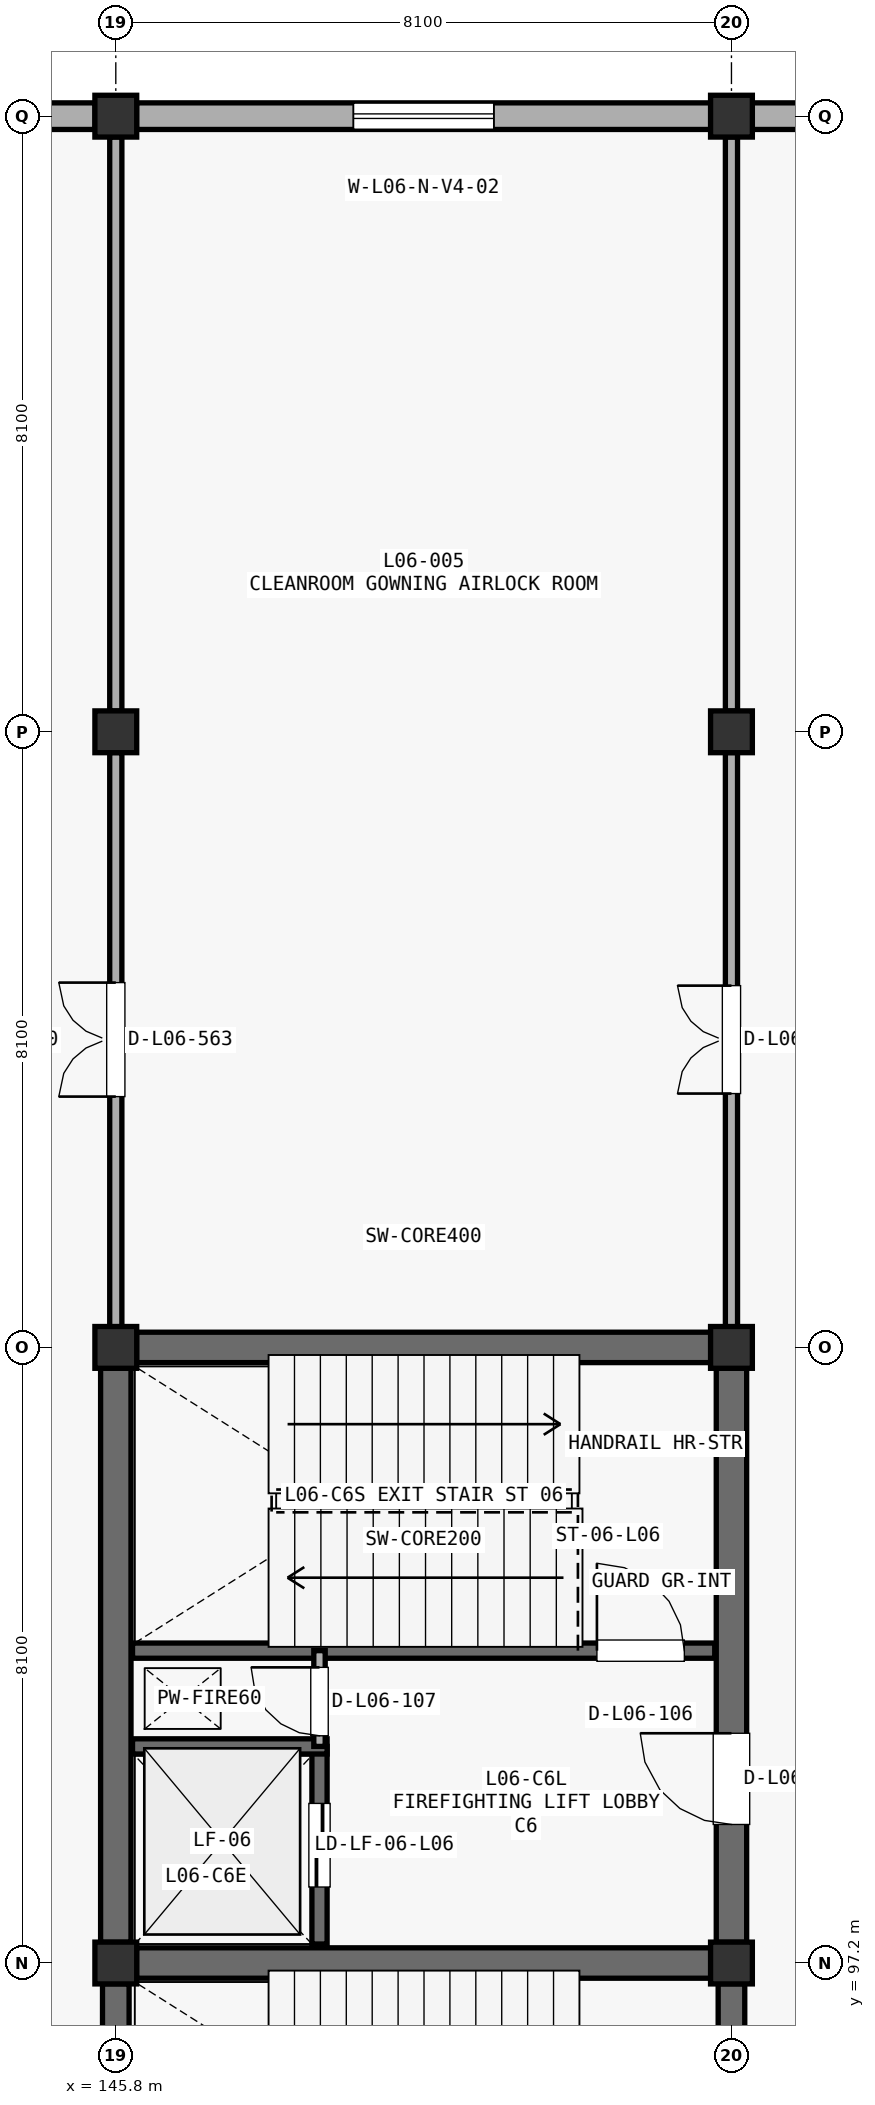
"""IFC4 building model, lengths in metres.
Left out: names, types, materials, properties, quantities, classifications, styles, units other than length and angle.
Written with IfcOpenShell. Run it as: python <this file> out.ifc"""

import sys

from ifc_helpers import new_model, si_unit, direction, frame, frame_2d, origin, origin_2d, place, context, subcontext, project, spatial, rectangle, extrude, element, fill, save


model = new_model("IFC4")
c1 = context("Model", 3, precision=1e-05, world=origin(), true_north=direction((0.0, 1.0)))
c2 = subcontext(c1, "Body", "Model", "MODEL_VIEW")
j1 = project(units=[si_unit("LENGTHUNIT", "METRE"), si_unit("PLANEANGLEUNIT", "RADIAN")], contexts=[c1])
p1 = place(None, origin())
s1 = spatial("IfcSite", under=j1, at=p1, CompositionType="ELEMENT")
p2 = place(p1, origin())
s2 = spatial("IfcBuilding", under=s1, at=p2, CompositionType="ELEMENT")
p3 = place(p2, frame((0.0, 0.0, 27.37)))
s3 = spatial("IfcBuildingStorey", under=s2, at=p3, CompositionType="ELEMENT", Elevation=27.37)
for number, where, z_axis, x_axis in (
    (1, (145.8, 97.2, 0.0), (0.0, 0.0, 1.0), (1.0, 0.0, 0.0)),
    (2, (145.8, 105.3, 0.0), (0.0, 0.0, 1.0), (1.0, 0.0, 0.0)),
    (3, (145.8, 113.4, 0.0), (0.0, 0.0, 1.0), (1.0, 0.0, 0.0)),
    (4, (145.8, 121.5, 0.0), (0.0, 0.0, 1.0), (1.0, 0.0, 0.0)),
    (5, (153.9, 97.2, 0.0), (0.0, 0.0, 1.0), (1.0, 0.0, 0.0)),
    (6, (153.9, 105.3, 0.0), (0.0, 0.0, 1.0), (1.0, 0.0, 0.0)),
    (7, (153.9, 113.4, 0.0), (0.0, 0.0, 1.0), (1.0, 0.0, 0.0)),
    (8, (153.9, 121.5, 0.0), (0.0, 0.0, 1.0), (1.0, 0.0, 0.0)),
):
    element("IfcColumn", number, at=place(p3, frame(where, z_axis=z_axis, x_axis=x_axis)), inside=s3, PredefinedType="COLUMN", context=c2, shape_type="SweptSolid", body=[
        extrude(rectangle(XDim=0.55, YDim=0.55, at=origin_2d()), origin(), (0.0, 0.0, 1.0), 4.42),
    ])
p4 = place(p3, frame((137.973, 121.5, 0.0), z_axis=(0.0, 0.0, 1.0), x_axis=(1.0, 0.0, 0.0)))
e9 = element("IfcWall", 9, at=p4, inside=s3, PredefinedType="STANDARD", context=c2, shape_type="SweptSolid", body=[
    extrude(rectangle(XDim=7.554, YDim=0.35, at=frame_2d((3.777, 0.0))), origin(), (0.0, 0.0, 1.0), 3.212),
])
p5 = place(p4, frame((2.452, 0.0, 0.85)))
e10 = element("IfcOpeningElement", 10, at=p5, cuts=e9, PredefinedType="OPENING", context=c2, shape_type="SweptSolid", body=[
    extrude(rectangle(XDim=2.65, YDim=1.8, at=frame_2d((1.325, 0.9))), frame((0.0, 0.185, 0.0), z_axis=(0.0, -1.0, 0.0), x_axis=(1.0, 0.0, 0.0)), (0.0, 0.0, 1.0), 0.37),
])
p6 = place(p3, frame((146.073, 121.5, 0.0), z_axis=(0.0, 0.0, 1.0), x_axis=(1.0, 0.0, 0.0)))
e11 = element("IfcWall", 11, at=p6, inside=s3, PredefinedType="STANDARD", context=c2, shape_type="SweptSolid", body=[
    extrude(rectangle(XDim=7.554, YDim=0.35, at=frame_2d((3.777, 0.0))), origin(), (0.0, 0.0, 1.0), 3.512),
])
p7 = place(p6, frame((2.852, 0.0, 0.85)))
e12 = element("IfcOpeningElement", 12, at=p7, cuts=e11, PredefinedType="OPENING", context=c2, shape_type="SweptSolid", body=[
    extrude(rectangle(XDim=1.85, YDim=1.8, at=frame_2d((0.925, 0.9))), frame((0.0, 0.185, 0.0), z_axis=(0.0, -1.0, 0.0), x_axis=(1.0, 0.0, 0.0)), (0.0, 0.0, 1.0), 0.37),
])
p8 = place(p3, frame((154.173, 121.5, 0.0), z_axis=(0.0, 0.0, 1.0), x_axis=(1.0, 0.0, 0.0)))
e13 = element("IfcWall", 13, at=p8, inside=s3, PredefinedType="STANDARD", context=c2, shape_type="SweptSolid", body=[
    extrude(rectangle(XDim=7.554, YDim=0.35, at=frame_2d((3.777, 0.0))), origin(), (0.0, 0.0, 1.0), 3.512),
])
p9 = place(p8, frame((3.002, 0.0, 0.85)))
e14 = element("IfcOpeningElement", 14, at=p9, cuts=e13, PredefinedType="OPENING", context=c2, shape_type="SweptSolid", body=[
    extrude(rectangle(XDim=1.55, YDim=1.8, at=frame_2d((0.775, 0.9))), frame((0.0, 0.185, 0.0), z_axis=(0.0, -1.0, 0.0), x_axis=(1.0, 0.0, 0.0)), (0.0, 0.0, 1.0), 0.37),
])
p10 = place(p3, frame((146.073, 105.3, 0.0), z_axis=(0.0, 0.0, 1.0), x_axis=(1.0, 0.0, 0.0)))
e15 = element("IfcWall", 15, at=p10, inside=s3, PredefinedType="SHEAR", context=c2, shape_type="SweptSolid", body=[
    extrude(rectangle(XDim=7.554, YDim=0.4, at=frame_2d((3.777, 0.0))), origin(), (0.0, 0.0, 1.0), 4.162),
])
p11 = place(p3, frame((145.8, 97.473, 0.0), z_axis=(0.0, 0.0, 1.0), x_axis=(0.0, 1.0, 0.0)))
e16 = element("IfcWall", 16, at=p11, inside=s3, PredefinedType="SHEAR", context=c2, shape_type="SweptSolid", body=[
    extrude(rectangle(XDim=7.554, YDim=0.4, at=frame_2d((3.777, 0.0))), origin(), (0.0, 0.0, 1.0), 4.162),
])
p12 = place(p3, frame((153.9, 97.473, 0.0), z_axis=(0.0, 0.0, 1.0), x_axis=(0.0, 1.0, 0.0)))
e17 = element("IfcWall", 17, at=p12, inside=s3, PredefinedType="SHEAR", context=c2, shape_type="SweptSolid", body=[
    extrude(rectangle(XDim=7.554, YDim=0.4, at=frame_2d((3.777, 0.0))), origin(), (0.0, 0.0, 1.0), 4.162),
])
p13 = place(p12, frame((1.55, 0.0, 0.0)))
e18 = element("IfcOpeningElement", 18, at=p13, cuts=e17, PredefinedType="OPENING", context=c2, shape_type="SweptSolid", body=[
    extrude(rectangle(XDim=1.2, YDim=2.2, at=frame_2d((0.6, 1.1))), frame((0.0, 0.21, 0.0), z_axis=(0.0, -1.0, 0.0), x_axis=(1.0, 0.0, 0.0)), (0.0, 0.0, 1.0), 0.42),
])
p14 = place(p3, frame((146.073, 97.2, 0.0), z_axis=(0.0, 0.0, 1.0), x_axis=(1.0, 0.0, 0.0)))
e19 = element("IfcWall", 19, at=p14, inside=s3, PredefinedType="SHEAR", context=c2, shape_type="SweptSolid", body=[
    extrude(rectangle(XDim=7.554, YDim=0.4, at=frame_2d((3.777, 0.0))), origin(), (0.0, 0.0, 1.0), 4.162),
])
p15 = place(p3, frame((146.02, 101.31, 0.0), z_axis=(0.0, 0.0, 1.0), x_axis=(1.0, 0.0, 0.0)))
e20 = element("IfcWall", 20, at=p15, inside=s3, PredefinedType="SHEAR", context=c2, shape_type="SweptSolid", body=[
    extrude(rectangle(XDim=7.66, YDim=0.2, at=frame_2d((3.83, 0.0))), origin(), (0.0, 0.0, 1.0), 4.162),
])
p16 = place(p15, frame((6.11, 0.0, 0.0)))
e21 = element("IfcOpeningElement", 21, at=p16, cuts=e20, PredefinedType="OPENING", context=c2, shape_type="SweptSolid", body=[
    extrude(rectangle(XDim=1.15, YDim=2.2, at=frame_2d((0.575, 1.1))), frame((0.0, 0.11, 0.0), z_axis=(0.0, -1.0, 0.0), x_axis=(1.0, 0.0, 0.0)), (0.0, 0.0, 1.0), 0.22),
])
p17 = place(p3, frame((148.48, 97.45, 0.0), z_axis=(0.0, 0.0, 1.0), x_axis=(0.0, 1.0, 0.0)))
e22 = element("IfcWall", 22, at=p17, inside=s3, PredefinedType="SHEAR", context=c2, shape_type="SweptSolid", body=[
    extrude(rectangle(XDim=2.6, YDim=0.2, at=frame_2d((1.3, 0.0))), origin(), (0.0, 0.0, 1.0), 4.162),
])
p18 = place(p17, frame((0.75, 0.0, 0.0)))
e23 = element("IfcOpeningElement", 23, at=p18, cuts=e22, PredefinedType="OPENING", context=c2, shape_type="SweptSolid", body=[
    extrude(rectangle(XDim=1.1, YDim=2.2, at=frame_2d((0.55, 1.1))), frame((0.0, 0.11, 0.0), z_axis=(0.0, -1.0, 0.0), x_axis=(1.0, 0.0, 0.0)), (0.0, 0.0, 1.0), 0.22),
])
p19 = place(p3, frame((146.02, 100.05, 0.0), z_axis=(0.0, 0.0, 1.0), x_axis=(1.0, 0.0, 0.0)))
e24 = element("IfcWall", 24, at=p19, inside=s3, PredefinedType="SHEAR", context=c2, shape_type="SweptSolid", body=[
    extrude(rectangle(XDim=2.56, YDim=0.2, at=frame_2d((1.28, 0.0))), origin(), (0.0, 0.0, 1.0), 4.162),
])
p20 = place(p3, frame((148.48, 100.05, 0.0), z_axis=(0.0, 0.0, 1.0), x_axis=(0.0, 1.0, 0.0)))
e25 = element("IfcWall", 25, at=p20, inside=s3, PredefinedType="PARTITIONING", context=c2, shape_type="SweptSolid", body=[
    extrude(rectangle(XDim=1.26, YDim=0.15, at=frame_2d((0.63, 0.0))), origin(), (0.0, 0.0, 1.0), 4.162),
])
p21 = place(p20, frame((0.14, 0.0, 0.0)))
e26 = element("IfcOpeningElement", 26, at=p21, cuts=e25, PredefinedType="OPENING", context=c2, shape_type="SweptSolid", body=[
    extrude(rectangle(XDim=0.9, YDim=2.15, at=frame_2d((0.45, 1.075))), frame((0.0, 0.085, 0.0), z_axis=(0.0, -1.0, 0.0), x_axis=(1.0, 0.0, 0.0)), (0.0, 0.0, 1.0), 0.17),
])
p22 = place(p3, frame((145.8, 89.373, 0.0), z_axis=(0.0, 0.0, 1.0), x_axis=(0.0, 1.0, 0.0)))
e27 = element("IfcWall", 27, at=p22, inside=s3, PredefinedType="SHEAR", context=c2, shape_type="SweptSolid", body=[
    extrude(rectangle(XDim=7.554, YDim=0.35, at=frame_2d((3.777, 0.0))), origin(), (0.0, 0.0, 1.0), 4.162),
])
p23 = place(p3, frame((153.9, 89.373, 0.0), z_axis=(0.0, 0.0, 1.0), x_axis=(0.0, 1.0, 0.0)))
e28 = element("IfcWall", 28, at=p23, inside=s3, PredefinedType="SHEAR", context=c2, shape_type="SweptSolid", body=[
    extrude(rectangle(XDim=7.554, YDim=0.35, at=frame_2d((3.777, 0.0))), origin(), (0.0, 0.0, 1.0), 4.162),
])
p24 = place(p23, frame((1.55, 0.0, 0.0)))
e29 = element("IfcOpeningElement", 29, at=p24, cuts=e28, PredefinedType="OPENING", context=c2, shape_type="SweptSolid", body=[
    extrude(rectangle(XDim=1.2, YDim=2.2, at=frame_2d((0.6, 1.1))), frame((0.0, 0.185, 0.0), z_axis=(0.0, -1.0, 0.0), x_axis=(1.0, 0.0, 0.0)), (0.0, 0.0, 1.0), 0.37),
])
p25 = place(p3, frame((145.8, 105.573, 0.0), z_axis=(0.0, 0.0, 1.0), x_axis=(0.0, 1.0, 0.0)))
e30 = element("IfcWall", 30, at=p25, inside=s3, PredefinedType="PARTITIONING", context=c2, shape_type="SweptSolid", body=[
    extrude(rectangle(XDim=7.554, YDim=0.16, at=frame_2d((3.777, 0.0))), origin(), (0.0, 0.0, 1.0), 3.512),
])
p26 = place(p25, frame((3.027, 0.0, 0.0)))
e31 = element("IfcOpeningElement", 31, at=p26, cuts=e30, PredefinedType="OPENING", context=c2, shape_type="SweptSolid", body=[
    extrude(rectangle(XDim=1.5, YDim=2.2, at=frame_2d((0.75, 1.1))), frame((0.0, 0.09, 0.0), z_axis=(0.0, -1.0, 0.0), x_axis=(1.0, 0.0, 0.0)), (0.0, 0.0, 1.0), 0.18),
])
p27 = place(p3, frame((145.8, 113.673, 0.0), z_axis=(0.0, 0.0, 1.0), x_axis=(0.0, 1.0, 0.0)))
e32 = element("IfcWall", 32, at=p27, inside=s3, PredefinedType="PARTITIONING", context=c2, shape_type="SweptSolid", body=[
    extrude(rectangle(XDim=7.554, YDim=0.16, at=frame_2d((3.777, 0.0))), origin(), (0.0, 0.0, 1.0), 3.562),
])
p28 = place(p3, frame((153.9, 105.573, 0.0), z_axis=(0.0, 0.0, 1.0), x_axis=(0.0, 1.0, 0.0)))
e33 = element("IfcWall", 33, at=p28, inside=s3, PredefinedType="PARTITIONING", context=c2, shape_type="SweptSolid", body=[
    extrude(rectangle(XDim=7.554, YDim=0.16, at=frame_2d((3.777, 0.0))), origin(), (0.0, 0.0, 1.0), 3.312),
])
p29 = place(p28, frame((3.067, 0.0, 0.0)))
e34 = element("IfcOpeningElement", 34, at=p29, cuts=e33, PredefinedType="OPENING", context=c2, shape_type="SweptSolid", body=[
    extrude(rectangle(XDim=1.42, YDim=2.25, at=frame_2d((0.71, 1.125))), frame((0.0, 0.09, 0.0), z_axis=(0.0, -1.0, 0.0), x_axis=(1.0, 0.0, 0.0)), (0.0, 0.0, 1.0), 0.18),
])
p30 = place(p3, frame((153.9, 113.673, 0.0), z_axis=(0.0, 0.0, 1.0), x_axis=(0.0, 1.0, 0.0)))
e35 = element("IfcWall", 35, at=p30, inside=s3, PredefinedType="PARTITIONING", context=c2, shape_type="SweptSolid", body=[
    extrude(rectangle(XDim=7.554, YDim=0.16, at=frame_2d((3.777, 0.0))), origin(), (0.0, 0.0, 1.0), 3.212),
])
p31 = place(p7, origin())
e36 = element("IfcWindow", 36, at=p31, inside=s3, PartitioningType="SINGLE_PANEL", PredefinedType="WINDOW", context=c2, shape_type="SweptSolid", body=[
    extrude(rectangle(XDim=1.85, YDim=1.8, at=frame_2d((0.925, 0.9))), frame((0.0, 0.03, 0.0), z_axis=(0.0, -1.0, 0.0), x_axis=(1.0, 0.0, 0.0)), (0.0, 0.0, 1.0), 0.06),
])
fill(e12, e36)
p32 = place(p13, origin())
e37 = element("IfcDoor", 37, at=p32, inside=s3, OperationType="SINGLE_SWING_RIGHT", PredefinedType="DOOR", context=c2, shape_type="SweptSolid", body=[
    extrude(rectangle(XDim=1.2, YDim=2.2, at=frame_2d((0.6, 1.1))), frame((0.0, 0.025, 0.0), z_axis=(0.0, -1.0, 0.0), x_axis=(1.0, 0.0, 0.0)), (0.0, 0.0, 1.0), 0.05),
])
fill(e18, e37)
p33 = place(p16, origin())
e38 = element("IfcDoor", 38, at=p33, inside=s3, OperationType="SINGLE_SWING_LEFT", PredefinedType="DOOR", context=c2, shape_type="SweptSolid", body=[
    extrude(rectangle(XDim=1.15, YDim=2.2, at=frame_2d((0.575, 1.1))), frame((0.0, 0.025, 0.0), z_axis=(0.0, -1.0, 0.0), x_axis=(1.0, 0.0, 0.0)), (0.0, 0.0, 1.0), 0.05),
])
fill(e21, e38)
p34 = place(p18, origin())
e39 = element("IfcDoor", 39, at=p34, inside=s3, OperationType="SLIDING_TO_LEFT", PredefinedType="DOOR", context=c2, shape_type="SweptSolid", body=[
    extrude(rectangle(XDim=1.1, YDim=2.2, at=frame_2d((0.55, 1.1))), frame((0.0, 0.025, 0.0), z_axis=(0.0, -1.0, 0.0), x_axis=(1.0, 0.0, 0.0)), (0.0, 0.0, 1.0), 0.05),
])
fill(e23, e39)
p35 = place(p21, origin())
e40 = element("IfcDoor", 40, at=p35, inside=s3, OperationType="SINGLE_SWING_RIGHT", PredefinedType="DOOR", context=c2, shape_type="SweptSolid", body=[
    extrude(rectangle(XDim=0.9, YDim=2.15, at=frame_2d((0.45, 1.075))), frame((0.0, 0.025, 0.0), z_axis=(0.0, -1.0, 0.0), x_axis=(1.0, 0.0, 0.0)), (0.0, 0.0, 1.0), 0.05),
])
fill(e26, e40)
p36 = place(p26, origin())
e41 = element("IfcDoor", 41, at=p36, inside=s3, OperationType="DOUBLE_SWING_LEFT", PredefinedType="DOOR", context=c2, shape_type="SweptSolid", body=[
    extrude(rectangle(XDim=1.5, YDim=2.2, at=frame_2d((0.75, 1.1))), frame((0.0, 0.025, 0.0), z_axis=(0.0, -1.0, 0.0), x_axis=(1.0, 0.0, 0.0)), (0.0, 0.0, 1.0), 0.05),
])
fill(e31, e41)
p37 = place(p29, origin())
e42 = element("IfcDoor", 42, at=p37, inside=s3, OperationType="DOUBLE_SWING_LEFT", PredefinedType="DOOR", context=c2, shape_type="SweptSolid", body=[
    extrude(rectangle(XDim=1.42, YDim=2.25, at=frame_2d((0.71, 1.125))), frame((0.0, 0.025, 0.0), z_axis=(0.0, -1.0, 0.0), x_axis=(1.0, 0.0, 0.0)), (0.0, 0.0, 1.0), 0.05),
])
fill(e34, e42)
save(model, sys.argv[1])
